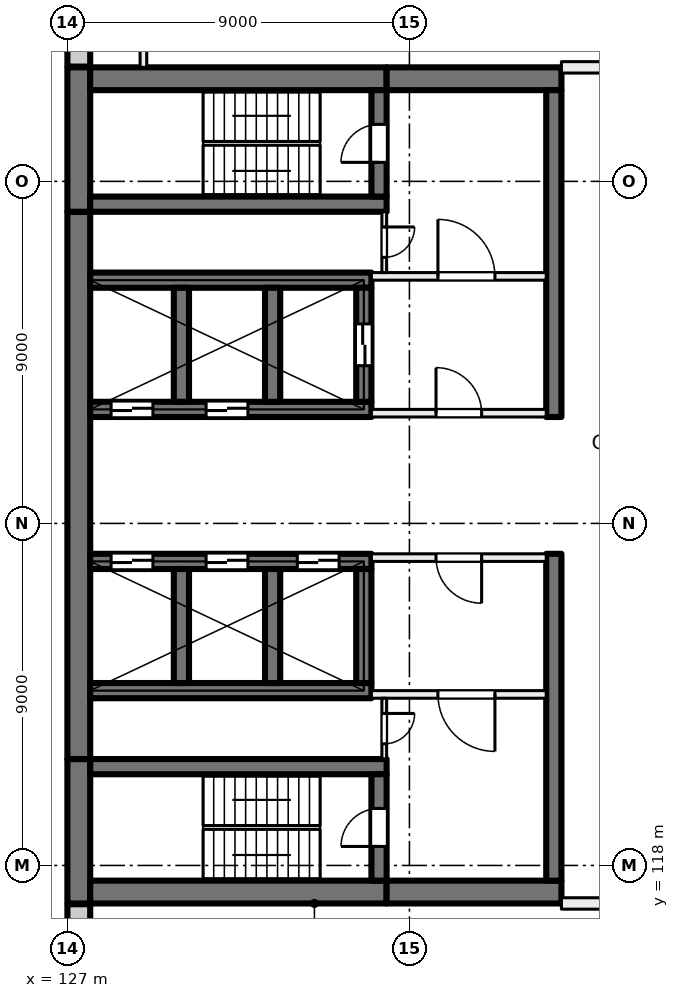
"""IFC4 building model, lengths in metres.
Left out: names, types, materials, properties, quantities, classifications, styles, units other than length and angle.
Written with IfcOpenShell. Run it as: python <this file> out.ifc"""

import sys

from ifc_helpers import new_model, si_unit, direction, frame, frame_2d, origin, place, context, subcontext, project, spatial, rectangle, extrude, element, fill, save


model = new_model("IFC4")
c1 = context("Model", 3, precision=1e-05, world=origin(), true_north=direction((0.0, 1.0)))
c2 = subcontext(c1, "Body", "Model", "MODEL_VIEW")
j1 = project(units=[si_unit("LENGTHUNIT", "METRE"), si_unit("PLANEANGLEUNIT", "RADIAN")], contexts=[c1])
p1 = place(None, origin())
s1 = spatial("IfcSite", under=j1, at=p1, CompositionType="ELEMENT")
p2 = place(p1, origin())
s2 = spatial("IfcBuilding", under=s1, at=p2, CompositionType="ELEMENT")
p3 = place(p2, frame((0.0, 0.0, 93.0)))
s3 = spatial("IfcBuildingStorey", under=s2, at=p3, CompositionType="ELEMENT", Elevation=93.0)
p4 = place(p3, frame((127.3, 117.0, 0.0), z_axis=(0.0, 0.0, 1.0), x_axis=(0.0, 1.0, 0.0)))
e1 = element("IfcWall", 1, at=p4, inside=s3, PredefinedType="SHEAR", context=c2, shape_type="SweptSolid", body=[
    extrude(rectangle(XDim=3.8, YDim=0.6, at=frame_2d((1.9, 0.0))), origin(), (0.0, 0.0, 1.0), 4.0),
])
p5 = place(p3, frame((127.3, 120.8, 0.0), z_axis=(0.0, 0.0, 1.0), x_axis=(0.0, 1.0, 0.0)))
e2 = element("IfcWall", 2, at=p5, inside=s3, PredefinedType="SHEAR", context=c2, shape_type="SweptSolid", body=[
    extrude(rectangle(XDim=14.4, YDim=0.6, at=frame_2d((7.2, 0.0))), origin(), (0.0, 0.0, 1.0), 4.0),
])
p6 = place(p3, frame((127.3, 135.2, 0.0), z_axis=(0.0, 0.0, 1.0), x_axis=(0.0, 1.0, 0.0)))
e3 = element("IfcWall", 3, at=p6, inside=s3, PredefinedType="SHEAR", context=c2, shape_type="SweptSolid", body=[
    extrude(rectangle(XDim=3.8, YDim=0.6, at=frame_2d((1.9, 0.0))), origin(), (0.0, 0.0, 1.0), 4.0),
])
for number, where, z_axis, x_axis in (
    (4, (127.6, 117.3, 0.0), (0.0, 0.0, 1.0), (1.0, 0.0, 0.0)),
    (5, (127.6, 138.7, 0.0), (0.0, 0.0, 1.0), (1.0, 0.0, 0.0)),
):
    element("IfcWall", number, at=place(p3, frame(where, z_axis=z_axis, x_axis=x_axis)), inside=s3, PredefinedType="SHEAR", context=c2, shape_type="SweptSolid", body=[
        extrude(rectangle(XDim=7.8, YDim=0.6, at=frame_2d((3.9, 0.0))), origin(), (0.0, 0.0, 1.0), 4.0),
    ])
for number, where, z_axis, x_axis in (
    (6, (135.4, 117.3, 0.0), (0.0, 0.0, 1.0), (1.0, 0.0, 0.0)),
    (7, (135.4, 138.7, 0.0), (0.0, 0.0, 1.0), (1.0, 0.0, 0.0)),
):
    element("IfcWall", number, at=place(p3, frame(where, z_axis=z_axis, x_axis=x_axis)), inside=s3, PredefinedType="SHEAR", context=c2, shape_type="SweptSolid", body=[
        extrude(rectangle(XDim=4.6, YDim=0.6, at=frame_2d((2.3, 0.0))), origin(), (0.0, 0.0, 1.0), 4.0),
    ])
p7 = place(p3, frame((127.6, 120.6, 0.0), z_axis=(0.0, 0.0, 1.0), x_axis=(1.0, 0.0, 0.0)))
e8 = element("IfcWall", 8, at=p7, inside=s3, PredefinedType="SHEAR", context=c2, shape_type="SweptSolid", body=[
    extrude(rectangle(XDim=7.8, YDim=0.4, at=frame_2d((3.9, 0.0))), origin(), (0.0, 0.0, 1.0), 4.0),
])
p8 = place(p3, frame((135.2, 117.6, 0.0), z_axis=(0.0, 0.0, 1.0), x_axis=(0.0, 1.0, 0.0)))
e9 = element("IfcWall", 9, at=p8, inside=s3, PredefinedType="SHEAR", context=c2, shape_type="SweptSolid", body=[
    extrude(rectangle(XDim=2.8, YDim=0.4, at=frame_2d((1.4, 0.0))), origin(), (0.0, 0.0, 1.0), 4.0),
])
p9 = place(p8, frame((0.9, 0.0, 0.0)))
e10 = element("IfcOpeningElement", 10, at=p9, cuts=e9, PredefinedType="OPENING", context=c2, shape_type="SweptSolid", body=[
    extrude(rectangle(XDim=1.0, YDim=2.1, at=frame_2d((0.5, 1.05))), frame((0.0, 0.21, 0.0), z_axis=(0.0, -1.0, 0.0), x_axis=(1.0, 0.0, 0.0)), (0.0, 0.0, 1.0), 0.42),
])
p10 = place(p3, frame((127.6, 135.4, 0.0), z_axis=(0.0, 0.0, 1.0), x_axis=(1.0, 0.0, 0.0)))
e11 = element("IfcWall", 11, at=p10, inside=s3, PredefinedType="SHEAR", context=c2, shape_type="SweptSolid", body=[
    extrude(rectangle(XDim=7.8, YDim=0.4, at=frame_2d((3.9, 0.0))), origin(), (0.0, 0.0, 1.0), 4.0),
])
p11 = place(p3, frame((135.2, 135.6, 0.0), z_axis=(0.0, 0.0, 1.0), x_axis=(0.0, 1.0, 0.0)))
e12 = element("IfcWall", 12, at=p11, inside=s3, PredefinedType="SHEAR", context=c2, shape_type="SweptSolid", body=[
    extrude(rectangle(XDim=2.8, YDim=0.4, at=frame_2d((1.4, 0.0))), origin(), (0.0, 0.0, 1.0), 4.0),
])
p12 = place(p11, frame((0.9, 0.0, 0.0)))
e13 = element("IfcOpeningElement", 13, at=p12, cuts=e12, PredefinedType="OPENING", context=c2, shape_type="SweptSolid", body=[
    extrude(rectangle(XDim=1.0, YDim=2.1, at=frame_2d((0.5, 1.05))), frame((0.0, 0.21, 0.0), z_axis=(0.0, -1.0, 0.0), x_axis=(1.0, 0.0, 0.0)), (0.0, 0.0, 1.0), 0.42),
])
p13 = place(p3, frame((127.6, 126.0, 0.0), z_axis=(0.0, 0.0, 1.0), x_axis=(1.0, 0.0, 0.0)))
e14 = element("IfcWall", 14, at=p13, inside=s3, PredefinedType="SHEAR", context=c2, shape_type="SweptSolid", body=[
    extrude(rectangle(XDim=7.4, YDim=0.4, at=frame_2d((3.7, 0.0))), origin(), (0.0, 0.0, 1.0), 4.0),
])
p14 = place(p13, frame((0.55, 0.0, 0.0)))
e15 = element("IfcOpeningElement", 15, at=p14, cuts=e14, PredefinedType="OPENING", context=c2, shape_type="SweptSolid", body=[
    extrude(rectangle(XDim=1.1, YDim=2.1, at=frame_2d((0.55, 1.05))), frame((0.0, 0.21, 0.0), z_axis=(0.0, -1.0, 0.0), x_axis=(1.0, 0.0, 0.0)), (0.0, 0.0, 1.0), 0.42),
])
p15 = place(p13, frame((3.05, 0.0, 0.0)))
e16 = element("IfcOpeningElement", 16, at=p15, cuts=e14, PredefinedType="OPENING", context=c2, shape_type="SweptSolid", body=[
    extrude(rectangle(XDim=1.1, YDim=2.1, at=frame_2d((0.55, 1.05))), frame((0.0, 0.21, 0.0), z_axis=(0.0, -1.0, 0.0), x_axis=(1.0, 0.0, 0.0)), (0.0, 0.0, 1.0), 0.42),
])
p16 = place(p13, frame((5.45, 0.0, 0.0)))
e17 = element("IfcOpeningElement", 17, at=p16, cuts=e14, PredefinedType="OPENING", context=c2, shape_type="SweptSolid", body=[
    extrude(rectangle(XDim=1.1, YDim=2.1, at=frame_2d((0.55, 1.05))), frame((0.0, 0.21, 0.0), z_axis=(0.0, -1.0, 0.0), x_axis=(1.0, 0.0, 0.0)), (0.0, 0.0, 1.0), 0.42),
])
p17 = place(p3, frame((127.6, 122.6, 0.0), z_axis=(0.0, 0.0, 1.0), x_axis=(1.0, 0.0, 0.0)))
e18 = element("IfcWall", 18, at=p17, inside=s3, PredefinedType="SHEAR", context=c2, shape_type="SweptSolid", body=[
    extrude(rectangle(XDim=7.4, YDim=0.4, at=frame_2d((3.7, 0.0))), origin(), (0.0, 0.0, 1.0), 4.0),
])
for number, where, z_axis, x_axis in (
    (19, (130.0, 122.8, 0.0), (0.0, 0.0, 1.0), (0.0, 1.0, 0.0)),
    (20, (132.4, 122.8, 0.0), (0.0, 0.0, 1.0), (0.0, 1.0, 0.0)),
    (21, (134.8, 122.8, 0.0), (0.0, 0.0, 1.0), (0.0, 1.0, 0.0)),
):
    element("IfcWall", number, at=place(p3, frame(where, z_axis=z_axis, x_axis=x_axis)), inside=s3, PredefinedType="SHEAR", context=c2, shape_type="SweptSolid", body=[
        extrude(rectangle(XDim=3.0, YDim=0.4, at=frame_2d((1.5, 0.0))), origin(), (0.0, 0.0, 1.0), 4.0),
    ])
p18 = place(p3, frame((127.6, 130.0, 0.0), z_axis=(0.0, 0.0, 1.0), x_axis=(1.0, 0.0, 0.0)))
e22 = element("IfcWall", 22, at=p18, inside=s3, PredefinedType="SHEAR", context=c2, shape_type="SweptSolid", body=[
    extrude(rectangle(XDim=7.4, YDim=0.4, at=frame_2d((3.7, 0.0))), origin(), (0.0, 0.0, 1.0), 4.0),
])
p19 = place(p18, frame((0.55, 0.0, 0.0)))
e23 = element("IfcOpeningElement", 23, at=p19, cuts=e22, PredefinedType="OPENING", context=c2, shape_type="SweptSolid", body=[
    extrude(rectangle(XDim=1.1, YDim=2.1, at=frame_2d((0.55, 1.05))), frame((0.0, 0.21, 0.0), z_axis=(0.0, -1.0, 0.0), x_axis=(1.0, 0.0, 0.0)), (0.0, 0.0, 1.0), 0.42),
])
p20 = place(p18, frame((3.05, 0.0, 0.0)))
e24 = element("IfcOpeningElement", 24, at=p20, cuts=e22, PredefinedType="OPENING", context=c2, shape_type="SweptSolid", body=[
    extrude(rectangle(XDim=1.1, YDim=2.1, at=frame_2d((0.55, 1.05))), frame((0.0, 0.21, 0.0), z_axis=(0.0, -1.0, 0.0), x_axis=(1.0, 0.0, 0.0)), (0.0, 0.0, 1.0), 0.42),
])
p21 = place(p3, frame((127.6, 133.4, 0.0), z_axis=(0.0, 0.0, 1.0), x_axis=(1.0, 0.0, 0.0)))
e25 = element("IfcWall", 25, at=p21, inside=s3, PredefinedType="SHEAR", context=c2, shape_type="SweptSolid", body=[
    extrude(rectangle(XDim=7.4, YDim=0.4, at=frame_2d((3.7, 0.0))), origin(), (0.0, 0.0, 1.0), 4.0),
])
for number, where, z_axis, x_axis in (
    (26, (130.0, 130.2, 0.0), (0.0, 0.0, 1.0), (0.0, 1.0, 0.0)),
    (27, (132.4, 130.2, 0.0), (0.0, 0.0, 1.0), (0.0, 1.0, 0.0)),
):
    element("IfcWall", number, at=place(p3, frame(where, z_axis=z_axis, x_axis=x_axis)), inside=s3, PredefinedType="SHEAR", context=c2, shape_type="SweptSolid", body=[
        extrude(rectangle(XDim=3.0, YDim=0.4, at=frame_2d((1.5, 0.0))), origin(), (0.0, 0.0, 1.0), 4.0),
    ])
p22 = place(p3, frame((134.8, 130.2, 0.0), z_axis=(0.0, 0.0, 1.0), x_axis=(0.0, 1.0, 0.0)))
e28 = element("IfcWall", 28, at=p22, inside=s3, PredefinedType="SHEAR", context=c2, shape_type="SweptSolid", body=[
    extrude(rectangle(XDim=3.0, YDim=0.4, at=frame_2d((1.5, 0.0))), origin(), (0.0, 0.0, 1.0), 4.0),
])
p23 = place(p22, frame((0.95, 0.0, 0.0)))
e29 = element("IfcOpeningElement", 29, at=p23, cuts=e28, PredefinedType="OPENING", context=c2, shape_type="SweptSolid", body=[
    extrude(rectangle(XDim=1.1, YDim=2.1, at=frame_2d((0.55, 1.05))), frame((0.0, 0.21, 0.0), z_axis=(0.0, -1.0, 0.0), x_axis=(1.0, 0.0, 0.0)), (0.0, 0.0, 1.0), 0.42),
])
for number, where, z_axis, x_axis in (
    (30, (139.8, 117.6, 0.0), (0.0, 0.0, 1.0), (0.0, 1.0, 0.0)),
    (31, (139.8, 129.8, 0.0), (0.0, 0.0, 1.0), (0.0, 1.0, 0.0)),
):
    element("IfcWall", number, at=place(p3, frame(where, z_axis=z_axis, x_axis=x_axis)), inside=s3, PredefinedType="SHEAR", context=c2, shape_type="SweptSolid", body=[
        extrude(rectangle(XDim=8.6, YDim=0.4, at=frame_2d((4.3, 0.0))), origin(), (0.0, 0.0, 1.0), 4.0),
    ])
p24 = place(p3, frame((127.3, 139.02, 0.0), z_axis=(0.0, 0.0, 1.0), x_axis=(0.0, 1.0, 0.0)))
e32 = element("IfcWall", 32, at=p24, inside=s3, PredefinedType="SOLIDWALL", context=c2, shape_type="SweptSolid", body=[
    extrude(rectangle(XDim=2.98, YDim=0.6, at=frame_2d((1.49, 0.0))), origin(), (0.0, 0.0, 1.0), 3.625),
])
p25 = place(p3, frame((127.3, 114.07, 0.0), z_axis=(0.0, 0.0, 1.0), x_axis=(0.0, 1.0, 0.0)))
e33 = element("IfcWall", 33, at=p25, inside=s3, PredefinedType="SOLIDWALL", context=c2, shape_type="SweptSolid", body=[
    extrude(rectangle(XDim=2.91, YDim=0.6, at=frame_2d((1.455, 0.0))), origin(), (0.0, 0.0, 1.0), 3.625),
])
p26 = place(p3, frame((135.0, 129.9, 0.0), z_axis=(0.0, 0.0, 1.0), x_axis=(1.0, 0.0, 0.0)))
e34 = element("IfcWall", 34, at=p26, inside=s3, PredefinedType="PARTITIONING", context=c2, shape_type="SweptSolid", body=[
    extrude(rectangle(XDim=4.6, YDim=0.2, at=frame_2d((2.3, 0.0))), origin(), (0.0, 0.0, 1.0), 3.625),
])
p27 = place(p26, frame((1.7, 0.0, 0.0)))
e35 = element("IfcOpeningElement", 35, at=p27, cuts=e34, PredefinedType="OPENING", context=c2, shape_type="SweptSolid", body=[
    extrude(rectangle(XDim=1.2, YDim=2.1, at=frame_2d((0.6, 1.05))), frame((0.0, 0.11, 0.0), z_axis=(0.0, -1.0, 0.0), x_axis=(1.0, 0.0, 0.0)), (0.0, 0.0, 1.0), 0.22),
])
p28 = place(p3, frame((135.0, 133.5, 0.0), z_axis=(0.0, 0.0, 1.0), x_axis=(1.0, 0.0, 0.0)))
e36 = element("IfcWall", 36, at=p28, inside=s3, PredefinedType="PARTITIONING", context=c2, shape_type="SweptSolid", body=[
    extrude(rectangle(XDim=4.6, YDim=0.2, at=frame_2d((2.3, 0.0))), origin(), (0.0, 0.0, 1.0), 3.625),
])
p29 = place(p28, frame((1.75, 0.0, 0.0)))
e37 = element("IfcOpeningElement", 37, at=p29, cuts=e36, PredefinedType="OPENING", context=c2, shape_type="SweptSolid", body=[
    extrude(rectangle(XDim=1.5, YDim=2.1, at=frame_2d((0.75, 1.05))), frame((0.0, 0.11, 0.0), z_axis=(0.0, -1.0, 0.0), x_axis=(1.0, 0.0, 0.0)), (0.0, 0.0, 1.0), 0.22),
])
p30 = place(p3, frame((135.337, 135.2, 0.0), z_axis=(0.0, 0.0, 1.0), x_axis=(0.0, -1.0, 0.0)))
e38 = element("IfcWall", 38, at=p30, inside=s3, PredefinedType="PARTITIONING", context=c2, shape_type="SweptSolid", body=[
    extrude(rectangle(XDim=1.6, YDim=0.125, at=frame_2d((0.8, 0.0))), origin(), (0.0, 0.0, 1.0), 3.625),
])
p31 = place(p30, frame((0.4, 0.0, 0.0)))
e39 = element("IfcOpeningElement", 39, at=p31, cuts=e38, PredefinedType="OPENING", context=c2, shape_type="SweptSolid", body=[
    extrude(rectangle(XDim=0.8, YDim=2.1, at=frame_2d((0.4, 1.05))), frame((0.0, 0.073, 0.0), z_axis=(0.0, -1.0, 0.0), x_axis=(1.0, 0.0, 0.0)), (0.0, 0.0, 1.0), 0.145),
])
p32 = place(p3, frame((139.6, 126.1, 0.0), z_axis=(0.0, 0.0, 1.0), x_axis=(-1.0, 0.0, 0.0)))
e40 = element("IfcWall", 40, at=p32, inside=s3, PredefinedType="PARTITIONING", context=c2, shape_type="SweptSolid", body=[
    extrude(rectangle(XDim=4.6, YDim=0.2, at=frame_2d((2.3, 0.0))), origin(), (0.0, 0.0, 1.0), 3.625),
])
p33 = place(p32, frame((1.7, 0.0, 0.0)))
e41 = element("IfcOpeningElement", 41, at=p33, cuts=e40, PredefinedType="OPENING", context=c2, shape_type="SweptSolid", body=[
    extrude(rectangle(XDim=1.2, YDim=2.1, at=frame_2d((0.6, 1.05))), frame((0.0, 0.11, 0.0), z_axis=(0.0, -1.0, 0.0), x_axis=(1.0, 0.0, 0.0)), (0.0, 0.0, 1.0), 0.22),
])
p34 = place(p3, frame((139.6, 122.5, 0.0), z_axis=(0.0, 0.0, 1.0), x_axis=(-1.0, 0.0, 0.0)))
e42 = element("IfcWall", 42, at=p34, inside=s3, PredefinedType="PARTITIONING", context=c2, shape_type="SweptSolid", body=[
    extrude(rectangle(XDim=4.6, YDim=0.2, at=frame_2d((2.3, 0.0))), origin(), (0.0, 0.0, 1.0), 3.625),
])
p35 = place(p34, frame((1.35, 0.0, 0.0)))
e43 = element("IfcOpeningElement", 43, at=p35, cuts=e42, PredefinedType="OPENING", context=c2, shape_type="SweptSolid", body=[
    extrude(rectangle(XDim=1.5, YDim=2.1, at=frame_2d((0.75, 1.05))), frame((0.0, 0.11, 0.0), z_axis=(0.0, -1.0, 0.0), x_axis=(1.0, 0.0, 0.0)), (0.0, 0.0, 1.0), 0.22),
])
p36 = place(p3, frame((135.337, 122.4, 0.0), z_axis=(0.0, 0.0, 1.0), x_axis=(0.0, -1.0, 0.0)))
e44 = element("IfcWall", 44, at=p36, inside=s3, PredefinedType="PARTITIONING", context=c2, shape_type="SweptSolid", body=[
    extrude(rectangle(XDim=1.6, YDim=0.125, at=frame_2d((0.8, 0.0))), origin(), (0.0, 0.0, 1.0), 3.625),
])
p37 = place(p36, frame((0.4, 0.0, 0.0)))
e45 = element("IfcOpeningElement", 45, at=p37, cuts=e44, PredefinedType="OPENING", context=c2, shape_type="SweptSolid", body=[
    extrude(rectangle(XDim=0.8, YDim=2.1, at=frame_2d((0.4, 1.05))), frame((0.0, 0.073, 0.0), z_axis=(0.0, -1.0, 0.0), x_axis=(1.0, 0.0, 0.0)), (0.0, 0.0, 1.0), 0.145),
])
p38 = place(p3, frame((129.0, 139.0, 0.0), z_axis=(0.0, 0.0, 1.0), x_axis=(0.0, 1.0, 0.0)))
e46 = element("IfcWall", 46, at=p38, inside=s3, PredefinedType="PARTITIONING", context=c2, shape_type="SweptSolid", body=[
    extrude(rectangle(XDim=2.888, YDim=0.175, at=frame_2d((1.444, 0.0))), origin(), (0.0, 0.0, 1.0), 3.625),
])
p39 = place(p38, frame((0.8, 0.0, 0.0)))
e47 = element("IfcOpeningElement", 47, at=p39, cuts=e46, PredefinedType="OPENING", context=c2, shape_type="SweptSolid", body=[
    extrude(rectangle(XDim=1.2, YDim=2.1, at=frame_2d((0.6, 1.05))), frame((0.0, 0.097, 0.0), z_axis=(0.0, -1.0, 0.0), x_axis=(1.0, 0.0, 0.0)), (0.0, 0.0, 1.0), 0.195),
])
p40 = place(p3, frame((144.35, 139.0, 0.0), z_axis=(0.0, 0.0, 1.0), x_axis=(-1.0, 0.0, 0.0)))
e48 = element("IfcWall", 48, at=p40, inside=s3, PredefinedType="PARTITIONING", context=c2, shape_type="SweptSolid", body=[
    extrude(rectangle(XDim=4.35, YDim=0.3, at=frame_2d((2.175, 0.0))), origin(), (0.0, 0.0, 1.0), 3.625),
])
p41 = place(p40, frame((1.667, 0.0, 0.0)))
e49 = element("IfcOpeningElement", 49, at=p41, cuts=e48, PredefinedType="OPENING", context=c2, shape_type="SweptSolid", body=[
    extrude(rectangle(XDim=1.0, YDim=2.1, at=frame_2d((0.5, 1.05))), frame((0.0, 0.16, 0.0), z_axis=(0.0, -1.0, 0.0), x_axis=(1.0, 0.0, 0.0)), (0.0, 0.0, 1.0), 0.32),
])
p42 = place(p3, frame((144.35, 117.0, 0.0), z_axis=(0.0, 0.0, 1.0), x_axis=(-1.0, 0.0, 0.0)))
e50 = element("IfcWall", 50, at=p42, inside=s3, PredefinedType="PARTITIONING", context=c2, shape_type="SweptSolid", body=[
    extrude(rectangle(XDim=4.35, YDim=0.3, at=frame_2d((2.175, 0.0))), origin(), (0.0, 0.0, 1.0), 3.625),
])
p43 = place(p42, frame((1.267, 0.0, 0.0)))
e51 = element("IfcOpeningElement", 51, at=p43, cuts=e50, PredefinedType="OPENING", context=c2, shape_type="SweptSolid", body=[
    extrude(rectangle(XDim=1.8, YDim=2.1, at=frame_2d((0.9, 1.05))), frame((0.0, 0.16, 0.0), z_axis=(0.0, -1.0, 0.0), x_axis=(1.0, 0.0, 0.0)), (0.0, 0.0, 1.0), 0.32),
])
p44 = place(p19, origin())
e52 = element("IfcDoor", 52, at=p44, inside=s3, OperationType="DOUBLE_DOOR_SLIDING", PredefinedType="DOOR", context=c2, shape_type="SweptSolid", body=[
    extrude(rectangle(XDim=1.1, YDim=2.1, at=frame_2d((0.55, 1.05))), frame((0.0, 0.025, 0.0), z_axis=(0.0, -1.0, 0.0), x_axis=(1.0, 0.0, 0.0)), (0.0, 0.0, 1.0), 0.05),
])
fill(e23, e52)
p45 = place(p20, origin())
e53 = element("IfcDoor", 53, at=p45, inside=s3, OperationType="DOUBLE_DOOR_SLIDING", PredefinedType="DOOR", context=c2, shape_type="SweptSolid", body=[
    extrude(rectangle(XDim=1.1, YDim=2.1, at=frame_2d((0.55, 1.05))), frame((0.0, 0.025, 0.0), z_axis=(0.0, -1.0, 0.0), x_axis=(1.0, 0.0, 0.0)), (0.0, 0.0, 1.0), 0.05),
])
fill(e24, e53)
p46 = place(p14, origin())
e54 = element("IfcDoor", 54, at=p46, inside=s3, OperationType="DOUBLE_DOOR_SLIDING", PredefinedType="DOOR", context=c2, shape_type="SweptSolid", body=[
    extrude(rectangle(XDim=1.1, YDim=2.1, at=frame_2d((0.55, 1.05))), frame((0.0, 0.025, 0.0), z_axis=(0.0, -1.0, 0.0), x_axis=(1.0, 0.0, 0.0)), (0.0, 0.0, 1.0), 0.05),
])
fill(e15, e54)
p47 = place(p15, origin())
e55 = element("IfcDoor", 55, at=p47, inside=s3, OperationType="DOUBLE_DOOR_SLIDING", PredefinedType="DOOR", context=c2, shape_type="SweptSolid", body=[
    extrude(rectangle(XDim=1.1, YDim=2.1, at=frame_2d((0.55, 1.05))), frame((0.0, 0.025, 0.0), z_axis=(0.0, -1.0, 0.0), x_axis=(1.0, 0.0, 0.0)), (0.0, 0.0, 1.0), 0.05),
])
fill(e16, e55)
p48 = place(p16, origin())
e56 = element("IfcDoor", 56, at=p48, inside=s3, OperationType="DOUBLE_DOOR_SLIDING", PredefinedType="DOOR", context=c2, shape_type="SweptSolid", body=[
    extrude(rectangle(XDim=1.1, YDim=2.1, at=frame_2d((0.55, 1.05))), frame((0.0, 0.025, 0.0), z_axis=(0.0, -1.0, 0.0), x_axis=(1.0, 0.0, 0.0)), (0.0, 0.0, 1.0), 0.05),
])
fill(e17, e56)
p49 = place(p27, origin())
e57 = element("IfcDoor", 57, at=p49, inside=s3, OperationType="DOUBLE_DOOR_SINGLE_SWING", PredefinedType="DOOR", context=c2, shape_type="SweptSolid", body=[
    extrude(rectangle(XDim=1.2, YDim=2.1, at=frame_2d((0.6, 1.05))), frame((0.0, 0.025, 0.0), z_axis=(0.0, -1.0, 0.0), x_axis=(1.0, 0.0, 0.0)), (0.0, 0.0, 1.0), 0.05),
])
fill(e35, e57)
p50 = place(p29, origin())
e58 = element("IfcDoor", 58, at=p50, inside=s3, OperationType="DOUBLE_DOOR_SINGLE_SWING", PredefinedType="DOOR", context=c2, shape_type="SweptSolid", body=[
    extrude(rectangle(XDim=1.5, YDim=2.1, at=frame_2d((0.75, 1.05))), frame((0.0, 0.025, 0.0), z_axis=(0.0, -1.0, 0.0), x_axis=(1.0, 0.0, 0.0)), (0.0, 0.0, 1.0), 0.05),
])
fill(e37, e58)
p51 = place(p12, origin())
e59 = element("IfcDoor", 59, at=p51, inside=s3, OperationType="SINGLE_SWING_LEFT", PredefinedType="DOOR", context=c2, shape_type="SweptSolid", body=[
    extrude(rectangle(XDim=1.0, YDim=2.1, at=frame_2d((0.5, 1.05))), frame((0.0, 0.025, 0.0), z_axis=(0.0, -1.0, 0.0), x_axis=(1.0, 0.0, 0.0)), (0.0, 0.0, 1.0), 0.05),
])
fill(e13, e59)
p52 = place(p31, origin())
e60 = element("IfcDoor", 60, at=p52, inside=s3, OperationType="SINGLE_SWING_RIGHT", PredefinedType="DOOR", context=c2, shape_type="SweptSolid", body=[
    extrude(rectangle(XDim=0.8, YDim=2.1, at=frame_2d((0.4, 1.05))), frame((0.0, 0.025, 0.0), z_axis=(0.0, -1.0, 0.0), x_axis=(1.0, 0.0, 0.0)), (0.0, 0.0, 1.0), 0.05),
])
fill(e39, e60)
p53 = place(p33, origin())
e61 = element("IfcDoor", 61, at=p53, inside=s3, OperationType="DOUBLE_DOOR_SINGLE_SWING", PredefinedType="DOOR", context=c2, shape_type="SweptSolid", body=[
    extrude(rectangle(XDim=1.2, YDim=2.1, at=frame_2d((0.6, 1.05))), frame((0.0, 0.025, 0.0), z_axis=(0.0, -1.0, 0.0), x_axis=(1.0, 0.0, 0.0)), (0.0, 0.0, 1.0), 0.05),
])
fill(e41, e61)
p54 = place(p35, origin())
e62 = element("IfcDoor", 62, at=p54, inside=s3, OperationType="DOUBLE_DOOR_SINGLE_SWING", PredefinedType="DOOR", context=c2, shape_type="SweptSolid", body=[
    extrude(rectangle(XDim=1.5, YDim=2.1, at=frame_2d((0.75, 1.05))), frame((0.0, 0.025, 0.0), z_axis=(0.0, -1.0, 0.0), x_axis=(1.0, 0.0, 0.0)), (0.0, 0.0, 1.0), 0.05),
])
fill(e43, e62)
p55 = place(p9, origin())
e63 = element("IfcDoor", 63, at=p55, inside=s3, OperationType="SINGLE_SWING_RIGHT", PredefinedType="DOOR", context=c2, shape_type="SweptSolid", body=[
    extrude(rectangle(XDim=1.0, YDim=2.1, at=frame_2d((0.5, 1.05))), frame((0.0, 0.025, 0.0), z_axis=(0.0, -1.0, 0.0), x_axis=(1.0, 0.0, 0.0)), (0.0, 0.0, 1.0), 0.05),
])
fill(e10, e63)
p56 = place(p37, origin())
e64 = element("IfcDoor", 64, at=p56, inside=s3, OperationType="SINGLE_SWING_LEFT", PredefinedType="DOOR", context=c2, shape_type="SweptSolid", body=[
    extrude(rectangle(XDim=0.8, YDim=2.1, at=frame_2d((0.4, 1.05))), frame((0.0, 0.025, 0.0), z_axis=(0.0, -1.0, 0.0), x_axis=(1.0, 0.0, 0.0)), (0.0, 0.0, 1.0), 0.05),
])
fill(e45, e64)
p57 = place(p23, origin())
e65 = element("IfcDoor", 65, at=p57, inside=s3, OperationType="DOUBLE_DOOR_SLIDING", PredefinedType="DOOR", context=c2, shape_type="SweptSolid", body=[
    extrude(rectangle(XDim=1.1, YDim=2.1, at=frame_2d((0.55, 1.05))), frame((0.0, 0.025, 0.0), z_axis=(0.0, -1.0, 0.0), x_axis=(1.0, 0.0, 0.0)), (0.0, 0.0, 1.0), 0.05),
])
fill(e29, e65)
save(model, sys.argv[1])
